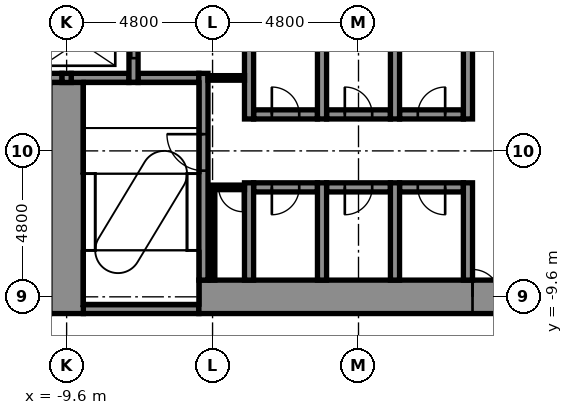
"""IFC4 building model, lengths in metres.
Left out: names, types, materials, properties, quantities, classifications, styles, units other than length and angle.
Written with IfcOpenShell. Run it as: python <this file> out.ifc"""

import sys

from ifc_helpers import new_model, si_unit, direction, frame, frame_2d, origin, place, context, subcontext, project, spatial, rectangle, extrude, element, fill, save


model = new_model("IFC4")
c1 = context("Model", 3, precision=1e-05, world=origin(), true_north=direction((0.0, 1.0)))
c2 = subcontext(c1, "Body", "Model", "MODEL_VIEW")
j1 = project(units=[si_unit("LENGTHUNIT", "METRE"), si_unit("PLANEANGLEUNIT", "RADIAN")], contexts=[c1])
p1 = place(None, origin())
s1 = spatial("IfcSite", under=j1, at=p1, CompositionType="ELEMENT")
p2 = place(p1, origin())
s2 = spatial("IfcBuilding", under=s1, at=p2, CompositionType="ELEMENT")
p3 = place(p2, origin())
s3 = spatial("IfcBuildingStorey", under=s2, at=p3, CompositionType="ELEMENT", Elevation=0.0)
p4 = place(p3, frame((-9.05, -10.0, -0.4), z_axis=(0.0, 0.0, 1.0), x_axis=(1.0, 0.0, 0.0)))
e1 = element("IfcWall", 1, at=p4, inside=s3, PredefinedType="STANDARD", context=c2, shape_type="SweptSolid", body=[
    extrude(rectangle(XDim=3.8, YDim=0.3, at=frame_2d((1.9, 0.0))), origin(), (0.0, 0.0, 1.0), 7.1),
])
p5 = place(p3, frame((-5.25, -9.6, -0.4), z_axis=(0.0, 0.0, 1.0), x_axis=(1.0, 0.0, 0.0)))
e2 = element("IfcWall", 2, at=p5, inside=s3, PredefinedType="SHEAR", context=c2, shape_type="SweptSolid", body=[
    extrude(rectangle(XDim=10.2, YDim=1.1, at=frame_2d((5.1, 0.0))), origin(), (0.0, 0.0, 1.0), 7.1),
])
p6 = place(p5, frame((9.0, 0.0, 0.4)))
e3 = element("IfcOpeningElement", 3, at=p6, cuts=e2, PredefinedType="OPENING", context=c2, shape_type="SweptSolid", body=[
    extrude(rectangle(XDim=0.9, YDim=2.1, at=frame_2d((0.45, 1.05))), frame((0.0, 0.56, 0.0), z_axis=(0.0, -1.0, 0.0), x_axis=(1.0, 0.0, 0.0)), (0.0, 0.0, 1.0), 1.12),
])
p7 = place(p3, frame((-3.45, -6.0, -0.4), z_axis=(0.0, 0.0, 1.0), x_axis=(1.0, 0.0, 0.0)))
e4 = element("IfcWall", 4, at=p7, inside=s3, PredefinedType="STANDARD", context=c2, shape_type="SweptSolid", body=[
    extrude(rectangle(XDim=2.1, YDim=0.3, at=frame_2d((1.05, 0.0))), origin(), (0.0, 0.0, 1.0), 7.1),
])
p8 = place(p7, frame((0.6, 0.0, 0.4)))
e5 = element("IfcOpeningElement", 5, at=p8, cuts=e4, PredefinedType="OPENING", context=c2, shape_type="SweptSolid", body=[
    extrude(rectangle(XDim=0.9, YDim=2.1, at=frame_2d((0.45, 1.05))), frame((0.0, 0.16, 0.0), z_axis=(0.0, -1.0, 0.0), x_axis=(1.0, 0.0, 0.0)), (0.0, 0.0, 1.0), 0.32),
])
p9 = place(p3, frame((-1.05, -6.0, -0.4), z_axis=(0.0, 0.0, 1.0), x_axis=(1.0, 0.0, 0.0)))
e6 = element("IfcWall", 6, at=p9, inside=s3, PredefinedType="STANDARD", context=c2, shape_type="SweptSolid", body=[
    extrude(rectangle(XDim=2.1, YDim=0.3, at=frame_2d((1.05, 0.0))), origin(), (0.0, 0.0, 1.0), 7.1),
])
p10 = place(p9, frame((0.6, 0.0, 0.4)))
e7 = element("IfcOpeningElement", 7, at=p10, cuts=e6, PredefinedType="OPENING", context=c2, shape_type="SweptSolid", body=[
    extrude(rectangle(XDim=0.9, YDim=2.1, at=frame_2d((0.45, 1.05))), frame((0.0, 0.16, 0.0), z_axis=(0.0, -1.0, 0.0), x_axis=(1.0, 0.0, 0.0)), (0.0, 0.0, 1.0), 0.32),
])
p11 = place(p3, frame((1.35, -6.0, -0.4), z_axis=(0.0, 0.0, 1.0), x_axis=(1.0, 0.0, 0.0)))
e8 = element("IfcWall", 8, at=p11, inside=s3, PredefinedType="STANDARD", context=c2, shape_type="SweptSolid", body=[
    extrude(rectangle(XDim=2.1, YDim=0.3, at=frame_2d((1.05, 0.0))), origin(), (0.0, 0.0, 1.0), 7.1),
])
p12 = place(p11, frame((0.6, 0.0, 0.4)))
e9 = element("IfcOpeningElement", 9, at=p12, cuts=e8, PredefinedType="OPENING", context=c2, shape_type="SweptSolid", body=[
    extrude(rectangle(XDim=0.9, YDim=2.1, at=frame_2d((0.45, 1.05))), frame((0.0, 0.16, 0.0), z_axis=(0.0, -1.0, 0.0), x_axis=(1.0, 0.0, 0.0)), (0.0, 0.0, 1.0), 0.32),
])
p13 = place(p3, frame((-3.45, -3.6, -0.4), z_axis=(0.0, 0.0, 1.0), x_axis=(1.0, 0.0, 0.0)))
e10 = element("IfcWall", 10, at=p13, inside=s3, PredefinedType="STANDARD", context=c2, shape_type="SweptSolid", body=[
    extrude(rectangle(XDim=2.1, YDim=0.3, at=frame_2d((1.05, 0.0))), origin(), (0.0, 0.0, 1.0), 7.1),
])
p14 = place(p13, frame((0.6, 0.0, 0.4)))
e11 = element("IfcOpeningElement", 11, at=p14, cuts=e10, PredefinedType="OPENING", context=c2, shape_type="SweptSolid", body=[
    extrude(rectangle(XDim=0.9, YDim=2.1, at=frame_2d((0.45, 1.05))), frame((0.0, 0.16, 0.0), z_axis=(0.0, -1.0, 0.0), x_axis=(1.0, 0.0, 0.0)), (0.0, 0.0, 1.0), 0.32),
])
p15 = place(p3, frame((-1.05, -3.6, -0.4), z_axis=(0.0, 0.0, 1.0), x_axis=(1.0, 0.0, 0.0)))
e12 = element("IfcWall", 12, at=p15, inside=s3, PredefinedType="STANDARD", context=c2, shape_type="SweptSolid", body=[
    extrude(rectangle(XDim=2.1, YDim=0.3, at=frame_2d((1.05, 0.0))), origin(), (0.0, 0.0, 1.0), 7.1),
])
p16 = place(p15, frame((0.6, 0.0, 0.4)))
e13 = element("IfcOpeningElement", 13, at=p16, cuts=e12, PredefinedType="OPENING", context=c2, shape_type="SweptSolid", body=[
    extrude(rectangle(XDim=0.9, YDim=2.1, at=frame_2d((0.45, 1.05))), frame((0.0, 0.16, 0.0), z_axis=(0.0, -1.0, 0.0), x_axis=(1.0, 0.0, 0.0)), (0.0, 0.0, 1.0), 0.32),
])
p17 = place(p3, frame((1.35, -3.6, -0.4), z_axis=(0.0, 0.0, 1.0), x_axis=(1.0, 0.0, 0.0)))
e14 = element("IfcWall", 14, at=p17, inside=s3, PredefinedType="STANDARD", context=c2, shape_type="SweptSolid", body=[
    extrude(rectangle(XDim=2.1, YDim=0.3, at=frame_2d((1.05, 0.0))), origin(), (0.0, 0.0, 1.0), 7.1),
])
p18 = place(p17, frame((0.6, 0.0, 0.4)))
e15 = element("IfcOpeningElement", 15, at=p18, cuts=e14, PredefinedType="OPENING", context=c2, shape_type="SweptSolid", body=[
    extrude(rectangle(XDim=0.9, YDim=2.1, at=frame_2d((0.45, 1.05))), frame((0.0, 0.16, 0.0), z_axis=(0.0, -1.0, 0.0), x_axis=(1.0, 0.0, 0.0)), (0.0, 0.0, 1.0), 0.32),
])
p19 = place(p3, frame((-10.85, -2.4, -0.4), z_axis=(0.0, 0.0, 1.0), x_axis=(1.0, 0.0, 0.0)))
e16 = element("IfcWall", 16, at=p19, inside=s3, PredefinedType="STANDARD", context=c2, shape_type="SweptSolid", body=[
    extrude(rectangle(XDim=1.1, YDim=0.3, at=frame_2d((0.55, 0.0))), origin(), (0.0, 0.0, 1.0), 7.1),
])
p20 = place(p3, frame((-9.45, -2.4, -0.4), z_axis=(0.0, 0.0, 1.0), x_axis=(1.0, 0.0, 0.0)))
e17 = element("IfcWall", 17, at=p20, inside=s3, PredefinedType="STANDARD", context=c2, shape_type="SweptSolid", body=[
    extrude(rectangle(XDim=1.9, YDim=0.3, at=frame_2d((0.95, 0.0))), origin(), (0.0, 0.0, 1.0), 7.1),
])
p21 = place(p3, frame((-7.25, -2.4, -0.4), z_axis=(0.0, 0.0, 1.0), x_axis=(1.0, 0.0, 0.0)))
e18 = element("IfcWall", 18, at=p21, inside=s3, PredefinedType="STANDARD", context=c2, shape_type="SweptSolid", body=[
    extrude(rectangle(XDim=2.0, YDim=0.3, at=frame_2d((1.0, 0.0))), origin(), (0.0, 0.0, 1.0), 7.1),
])
p22 = place(p3, frame((-9.6, -10.15, -0.4), z_axis=(0.0, 0.0, 1.0), x_axis=(0.0, 1.0, 0.0)))
e19 = element("IfcWall", 19, at=p22, inside=s3, PredefinedType="SHEAR", context=c2, shape_type="SweptSolid", body=[
    extrude(rectangle(XDim=7.6, YDim=1.1, at=frame_2d((3.8, 0.0))), origin(), (0.0, 0.0, 1.0), 7.1),
])
p23 = place(p3, frame((-9.6, -2.55, -0.4), z_axis=(0.0, 0.0, 1.0), x_axis=(0.0, 1.0, 0.0)))
e20 = element("IfcWall", 20, at=p23, inside=s3, PredefinedType="STANDARD", context=c2, shape_type="SweptSolid", body=[
    extrude(rectangle(XDim=0.3, YDim=0.3, at=frame_2d((0.15, 0.0))), origin(), (0.0, 0.0, 1.0), 7.1),
])
p24 = place(p3, frame((-7.4, -2.55, -0.4), z_axis=(0.0, 0.0, 1.0), x_axis=(0.0, 1.0, 0.0)))
e21 = element("IfcWall", 21, at=p24, inside=s3, PredefinedType="STANDARD", context=c2, shape_type="SweptSolid", body=[
    extrude(rectangle(XDim=5.1, YDim=0.3, at=frame_2d((2.55, 0.0))), origin(), (0.0, 0.0, 1.0), 7.1),
])
p25 = place(p24, frame((0.8, 0.0, 0.4)))
e22 = element("IfcOpeningElement", 22, at=p25, cuts=e21, PredefinedType="OPENING", context=c2, shape_type="SweptSolid", body=[
    extrude(rectangle(XDim=1.1, YDim=2.1, at=frame_2d((0.55, 1.05))), frame((0.0, 0.16, 0.0), z_axis=(0.0, -1.0, 0.0), x_axis=(1.0, 0.0, 0.0)), (0.0, 0.0, 1.0), 0.32),
])
p26 = place(p24, frame((3.2, 0.0, 0.4)))
e23 = element("IfcOpeningElement", 23, at=p26, cuts=e21, PredefinedType="OPENING", context=c2, shape_type="SweptSolid", body=[
    extrude(rectangle(XDim=1.1, YDim=2.1, at=frame_2d((0.55, 1.05))), frame((0.0, 0.16, 0.0), z_axis=(0.0, -1.0, 0.0), x_axis=(1.0, 0.0, 0.0)), (0.0, 0.0, 1.0), 0.32),
])
p27 = place(p3, frame((-5.1, -9.05, -0.4), z_axis=(0.0, 0.0, 1.0), x_axis=(0.0, 1.0, 0.0)))
e24 = element("IfcWall", 24, at=p27, inside=s3, PredefinedType="STANDARD", context=c2, shape_type="SweptSolid", body=[
    extrude(rectangle(XDim=6.8, YDim=0.3, at=frame_2d((3.4, 0.0))), origin(), (0.0, 0.0, 1.0), 7.1),
])
p28 = place(p27, frame((3.6, 0.0, 0.4)))
e25 = element("IfcOpeningElement", 25, at=p28, cuts=e24, PredefinedType="OPENING", context=c2, shape_type="SweptSolid", body=[
    extrude(rectangle(XDim=1.2, YDim=2.1, at=frame_2d((0.6, 1.05))), frame((0.0, 0.16, 0.0), z_axis=(0.0, -1.0, 0.0), x_axis=(1.0, 0.0, 0.0)), (0.0, 0.0, 1.0), 0.32),
])
p29 = place(p3, frame((-3.6, -9.05, -0.4), z_axis=(0.0, 0.0, 1.0), x_axis=(0.0, 1.0, 0.0)))
e26 = element("IfcWall", 26, at=p29, inside=s3, PredefinedType="STANDARD", context=c2, shape_type="SweptSolid", body=[
    extrude(rectangle(XDim=3.2, YDim=0.3, at=frame_2d((1.6, 0.0))), origin(), (0.0, 0.0, 1.0), 7.1),
])
p30 = place(p3, frame((-3.6, -3.75, -0.4), z_axis=(0.0, 0.0, 1.0), x_axis=(0.0, 1.0, 0.0)))
e27 = element("IfcWall", 27, at=p30, inside=s3, PredefinedType="STANDARD", context=c2, shape_type="SweptSolid", body=[
    extrude(rectangle(XDim=7.5, YDim=0.3, at=frame_2d((3.75, 0.0))), origin(), (0.0, 0.0, 1.0), 7.1),
])
p31 = place(p3, frame((-1.2, -9.05, -0.4), z_axis=(0.0, 0.0, 1.0), x_axis=(0.0, 1.0, 0.0)))
e28 = element("IfcWall", 28, at=p31, inside=s3, PredefinedType="STANDARD", context=c2, shape_type="SweptSolid", body=[
    extrude(rectangle(XDim=3.2, YDim=0.3, at=frame_2d((1.6, 0.0))), origin(), (0.0, 0.0, 1.0), 7.1),
])
p32 = place(p3, frame((-1.2, -3.75, -0.4), z_axis=(0.0, 0.0, 1.0), x_axis=(0.0, 1.0, 0.0)))
e29 = element("IfcWall", 29, at=p32, inside=s3, PredefinedType="STANDARD", context=c2, shape_type="SweptSolid", body=[
    extrude(rectangle(XDim=7.5, YDim=0.3, at=frame_2d((3.75, 0.0))), origin(), (0.0, 0.0, 1.0), 7.1),
])
p33 = place(p3, frame((1.2, -9.05, -0.4), z_axis=(0.0, 0.0, 1.0), x_axis=(0.0, 1.0, 0.0)))
e30 = element("IfcWall", 30, at=p33, inside=s3, PredefinedType="STANDARD", context=c2, shape_type="SweptSolid", body=[
    extrude(rectangle(XDim=3.2, YDim=0.3, at=frame_2d((1.6, 0.0))), origin(), (0.0, 0.0, 1.0), 7.1),
])
p34 = place(p3, frame((1.2, -3.75, -0.4), z_axis=(0.0, 0.0, 1.0), x_axis=(0.0, 1.0, 0.0)))
e31 = element("IfcWall", 31, at=p34, inside=s3, PredefinedType="STANDARD", context=c2, shape_type="SweptSolid", body=[
    extrude(rectangle(XDim=7.5, YDim=0.3, at=frame_2d((3.75, 0.0))), origin(), (0.0, 0.0, 1.0), 7.1),
])
p35 = place(p3, frame((3.6, -9.05, -0.4), z_axis=(0.0, 0.0, 1.0), x_axis=(0.0, 1.0, 0.0)))
e32 = element("IfcWall", 32, at=p35, inside=s3, PredefinedType="STANDARD", context=c2, shape_type="SweptSolid", body=[
    extrude(rectangle(XDim=3.2, YDim=0.3, at=frame_2d((1.6, 0.0))), origin(), (0.0, 0.0, 1.0), 7.1),
])
p36 = place(p3, frame((3.6, -3.75, -0.4), z_axis=(0.0, 0.0, 1.0), x_axis=(0.0, 1.0, 0.0)))
e33 = element("IfcWall", 33, at=p36, inside=s3, PredefinedType="STANDARD", context=c2, shape_type="SweptSolid", body=[
    extrude(rectangle(XDim=7.5, YDim=0.3, at=frame_2d((3.75, 0.0))), origin(), (0.0, 0.0, 1.0), 7.1),
])
p37 = place(p3, frame((-4.8, -9.05, 0.0), z_axis=(0.0, 0.0, 1.0), x_axis=(0.0, 1.0, 0.0)))
e34 = element("IfcWall", 34, at=p37, inside=s3, PredefinedType="PARTITIONING", context=c2, shape_type="SweptSolid", body=[
    extrude(rectangle(XDim=3.05, YDim=0.15, at=frame_2d((1.525, 0.0))), origin(), (0.0, 0.0, 1.0), 6.7),
])
p38 = place(p3, frame((-4.8, -6.0, 0.0), z_axis=(0.0, 0.0, 1.0), x_axis=(1.0, 0.0, 0.0)))
e35 = element("IfcWall", 35, at=p38, inside=s3, PredefinedType="PARTITIONING", context=c2, shape_type="SweptSolid", body=[
    extrude(rectangle(XDim=1.05, YDim=0.15, at=frame_2d((0.525, 0.0))), origin(), (0.0, 0.0, 1.0), 6.7),
])
p39 = place(p38, frame((0.2, 0.0, 0.0)))
e36 = element("IfcOpeningElement", 36, at=p39, cuts=e35, PredefinedType="OPENING", context=c2, shape_type="SweptSolid", body=[
    extrude(rectangle(XDim=0.8, YDim=2.1, at=frame_2d((0.4, 1.05))), frame((0.0, 0.085, 0.0), z_axis=(0.0, -1.0, 0.0), x_axis=(1.0, 0.0, 0.0)), (0.0, 0.0, 1.0), 0.17),
])
p40 = place(p3, frame((-4.95, -2.4, 0.0), z_axis=(0.0, 0.0, 1.0), x_axis=(1.0, 0.0, 0.0)))
e37 = element("IfcWall", 37, at=p40, inside=s3, PredefinedType="PARTITIONING", context=c2, shape_type="SweptSolid", body=[
    extrude(rectangle(XDim=1.2, YDim=0.15, at=frame_2d((0.6, 0.0))), origin(), (0.0, 0.0, 1.0), 6.7),
])
p41 = place(p39, frame((0.8, 0.0, 0.0), z_axis=(0.0, 0.0, 1.0), x_axis=(-1.0, 0.0, 0.0)))
e38 = element("IfcDoor", 38, at=p41, inside=s3, OperationType="SINGLE_SWING_RIGHT", PredefinedType="DOOR", context=c2, shape_type="SweptSolid", body=[
    extrude(rectangle(XDim=0.8, YDim=2.1, at=frame_2d((0.4, 1.05))), frame((0.0, 0.025, 0.0), z_axis=(0.0, -1.0, 0.0), x_axis=(1.0, 0.0, 0.0)), (0.0, 0.0, 1.0), 0.05),
])
fill(e36, e38)
p42 = place(p25, origin())
e39 = element("IfcDoor", 39, at=p42, inside=s3, OperationType="DOUBLE_DOOR_SLIDING", PredefinedType="DOOR", context=c2, shape_type="SweptSolid", body=[
    extrude(rectangle(XDim=1.1, YDim=2.1, at=frame_2d((0.55, 1.05))), frame((0.0, 0.025, 0.0), z_axis=(0.0, -1.0, 0.0), x_axis=(1.0, 0.0, 0.0)), (0.0, 0.0, 1.0), 0.05),
])
fill(e22, e39)
p43 = place(p28, origin())
e40 = element("IfcDoor", 40, at=p43, inside=s3, OperationType="SINGLE_SWING_RIGHT", PredefinedType="DOOR", context=c2, shape_type="SweptSolid", body=[
    extrude(rectangle(XDim=1.2, YDim=2.1, at=frame_2d((0.6, 1.05))), frame((0.0, 0.025, 0.0), z_axis=(0.0, -1.0, 0.0), x_axis=(1.0, 0.0, 0.0)), (0.0, 0.0, 1.0), 0.05),
])
fill(e25, e40)
p44 = place(p14, origin())
e41 = element("IfcDoor", 41, at=p44, inside=s3, OperationType="SINGLE_SWING_LEFT", PredefinedType="DOOR", context=c2, shape_type="SweptSolid", body=[
    extrude(rectangle(XDim=0.9, YDim=2.1, at=frame_2d((0.45, 1.05))), frame((0.0, 0.025, 0.0), z_axis=(0.0, -1.0, 0.0), x_axis=(1.0, 0.0, 0.0)), (0.0, 0.0, 1.0), 0.05),
])
fill(e11, e41)
p45 = place(p16, origin())
e42 = element("IfcDoor", 42, at=p45, inside=s3, OperationType="SINGLE_SWING_LEFT", PredefinedType="DOOR", context=c2, shape_type="SweptSolid", body=[
    extrude(rectangle(XDim=0.9, YDim=2.1, at=frame_2d((0.45, 1.05))), frame((0.0, 0.025, 0.0), z_axis=(0.0, -1.0, 0.0), x_axis=(1.0, 0.0, 0.0)), (0.0, 0.0, 1.0), 0.05),
])
fill(e13, e42)
p46 = place(p18, origin())
e43 = element("IfcDoor", 43, at=p46, inside=s3, OperationType="SINGLE_SWING_RIGHT", PredefinedType="DOOR", context=c2, shape_type="SweptSolid", body=[
    extrude(rectangle(XDim=0.9, YDim=2.1, at=frame_2d((0.45, 1.05))), frame((0.0, 0.025, 0.0), z_axis=(0.0, -1.0, 0.0), x_axis=(1.0, 0.0, 0.0)), (0.0, 0.0, 1.0), 0.05),
])
fill(e15, e43)
p47 = place(p8, frame((0.9, 0.0, 0.0), z_axis=(0.0, 0.0, 1.0), x_axis=(-1.0, 0.0, 0.0)))
e44 = element("IfcDoor", 44, at=p47, inside=s3, OperationType="SINGLE_SWING_LEFT", PredefinedType="DOOR", context=c2, shape_type="SweptSolid", body=[
    extrude(rectangle(XDim=0.9, YDim=2.1, at=frame_2d((0.45, 1.05))), frame((0.0, 0.025, 0.0), z_axis=(0.0, -1.0, 0.0), x_axis=(1.0, 0.0, 0.0)), (0.0, 0.0, 1.0), 0.05),
])
fill(e5, e44)
p48 = place(p10, frame((0.9, 0.0, 0.0), z_axis=(0.0, 0.0, 1.0), x_axis=(-1.0, 0.0, 0.0)))
e45 = element("IfcDoor", 45, at=p48, inside=s3, OperationType="SINGLE_SWING_LEFT", PredefinedType="DOOR", context=c2, shape_type="SweptSolid", body=[
    extrude(rectangle(XDim=0.9, YDim=2.1, at=frame_2d((0.45, 1.05))), frame((0.0, 0.025, 0.0), z_axis=(0.0, -1.0, 0.0), x_axis=(1.0, 0.0, 0.0)), (0.0, 0.0, 1.0), 0.05),
])
fill(e7, e45)
p49 = place(p12, frame((0.9, 0.0, 0.0), z_axis=(0.0, 0.0, 1.0), x_axis=(-1.0, 0.0, 0.0)))
e46 = element("IfcDoor", 46, at=p49, inside=s3, OperationType="SINGLE_SWING_RIGHT", PredefinedType="DOOR", context=c2, shape_type="SweptSolid", body=[
    extrude(rectangle(XDim=0.9, YDim=2.1, at=frame_2d((0.45, 1.05))), frame((0.0, 0.025, 0.0), z_axis=(0.0, -1.0, 0.0), x_axis=(1.0, 0.0, 0.0)), (0.0, 0.0, 1.0), 0.05),
])
fill(e9, e46)
p50 = place(p6, origin())
e47 = element("IfcDoor", 47, at=p50, inside=s3, OperationType="SINGLE_SWING_LEFT", PredefinedType="DOOR", context=c2, shape_type="SweptSolid", body=[
    extrude(rectangle(XDim=0.9, YDim=2.1, at=frame_2d((0.45, 1.05))), frame((0.0, 0.025, 0.0), z_axis=(0.0, -1.0, 0.0), x_axis=(1.0, 0.0, 0.0)), (0.0, 0.0, 1.0), 0.05),
])
fill(e3, e47)
save(model, sys.argv[1])
